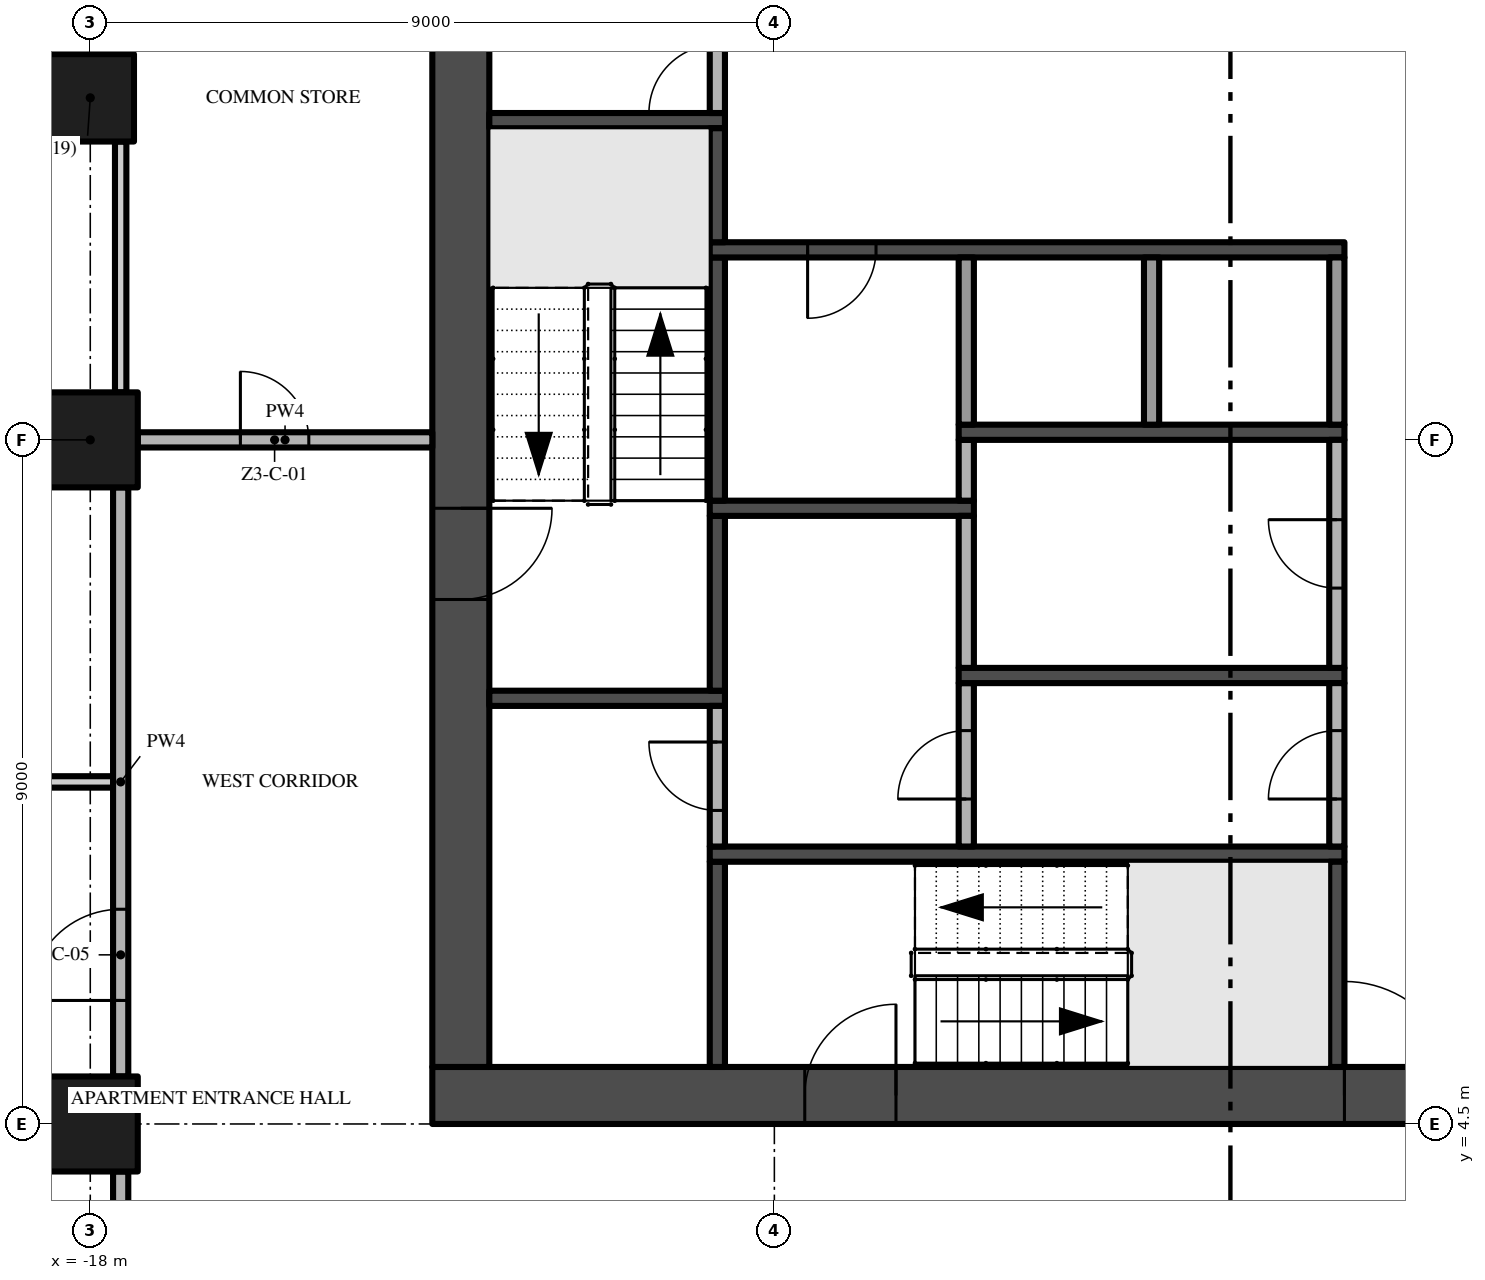
"""IFC4 building model, lengths in metres.
Left out: names, types, materials, properties, quantities, classifications, styles, units other than length and angle.
Written with IfcOpenShell. Run it as: python <this file> out.ifc"""

import sys

from ifc_helpers import new_model, si_unit, direction, frame, frame_2d, origin, origin_2d, place, context, subcontext, project, spatial, rectangle, extrude, element, fill, save


model = new_model("IFC4")
c1 = context("Model", 3, precision=1e-05, world=origin(), true_north=direction((0.0, 1.0)))
c2 = subcontext(c1, "Body", "Model", "MODEL_VIEW")
j1 = project(units=[si_unit("LENGTHUNIT", "METRE"), si_unit("PLANEANGLEUNIT", "RADIAN")], contexts=[c1])
p1 = place(None, origin())
s1 = spatial("IfcSite", under=j1, at=p1, CompositionType="ELEMENT")
p2 = place(p1, origin())
s2 = spatial("IfcBuilding", under=s1, at=p2, CompositionType="ELEMENT")
p3 = place(p2, frame((0.0, 0.0, 151.6)))
s3 = spatial("IfcBuildingStorey", under=s2, at=p3, CompositionType="ELEMENT", Elevation=151.6)
p4 = place(p3, frame((-13.5, 4.875, -0.3), z_axis=(0.0, 0.0, 1.0), x_axis=(1.0, 0.0, 0.0)))
e1 = element("IfcWall", 1, at=p4, inside=s3, PredefinedType="SHEAR", context=c2, shape_type="SweptSolid", body=[
    extrude(rectangle(XDim=27.0, YDim=0.75, at=frame_2d((13.5, 0.0))), origin(), (0.0, 0.0, 1.0), 3.8),
])
p5 = place(p4, frame((12.0, 0.0, 0.3)))
e2 = element("IfcOpeningElement", 2, at=p5, cuts=e1, PredefinedType="OPENING", context=c2, shape_type="SweptSolid", body=[
    extrude(rectangle(XDim=3.0, YDim=2.4, at=frame_2d((1.5, 1.2))), frame((0.0, 0.385, 0.0), z_axis=(0.0, -1.0, 0.0), x_axis=(1.0, 0.0, 0.0)), (0.0, 0.0, 1.0), 0.77),
])
p6 = place(p4, frame((4.9, 0.0, 0.3)))
e3 = element("IfcOpeningElement", 3, at=p6, cuts=e1, PredefinedType="OPENING", context=c2, shape_type="SweptSolid", body=[
    extrude(rectangle(XDim=1.2, YDim=2.2, at=frame_2d((0.6, 1.1))), frame((0.0, 0.385, 0.0), z_axis=(0.0, -1.0, 0.0), x_axis=(1.0, 0.0, 0.0)), (0.0, 0.0, 1.0), 0.77),
])
p7 = place(p4, frame((20.75, 0.0, 0.3)))
e4 = element("IfcOpeningElement", 4, at=p7, cuts=e1, PredefinedType="OPENING", context=c2, shape_type="SweptSolid", body=[
    extrude(rectangle(XDim=1.5, YDim=2.2, at=frame_2d((0.75, 1.1))), frame((0.0, 0.385, 0.0), z_axis=(0.0, -1.0, 0.0), x_axis=(1.0, 0.0, 0.0)), (0.0, 0.0, 1.0), 0.77),
])
p8 = place(p4, frame((17.4, 0.0, 0.3)))
e5 = element("IfcOpeningElement", 5, at=p8, cuts=e1, PredefinedType="OPENING", context=c2, shape_type="SweptSolid", body=[
    extrude(rectangle(XDim=1.2, YDim=2.2, at=frame_2d((0.6, 1.1))), frame((0.0, 0.385, 0.0), z_axis=(0.0, -1.0, 0.0), x_axis=(1.0, 0.0, 0.0)), (0.0, 0.0, 1.0), 0.77),
])
p9 = place(p3, frame((-13.125, 21.75, -0.3), z_axis=(0.0, 0.0, 1.0), x_axis=(0.0, -1.0, 0.0)))
e6 = element("IfcWall", 6, at=p9, inside=s3, PredefinedType="SHEAR", context=c2, shape_type="SweptSolid", body=[
    extrude(rectangle(XDim=16.5, YDim=0.75, at=frame_2d((8.25, 0.0))), origin(), (0.0, 0.0, 1.0), 3.8),
])
p10 = place(p9, frame((9.15, 0.0, 0.3)))
e7 = element("IfcOpeningElement", 7, at=p10, cuts=e6, PredefinedType="OPENING", context=c2, shape_type="SweptSolid", body=[
    extrude(rectangle(XDim=1.2, YDim=2.2, at=frame_2d((0.6, 1.1))), frame((0.0, 0.385, 0.0), z_axis=(0.0, -1.0, 0.0), x_axis=(1.0, 0.0, 0.0)), (0.0, 0.0, 1.0), 0.77),
])
for number, where, z_axis, x_axis in (
    (8, (-18.0, 13.5, 0.0), (0.0, 0.0, 1.0), (1.0, 0.0, 0.0)),
    (9, (-18.0, 4.5, 0.0), (0.0, 0.0, 1.0), (1.0, 0.0, 0.0)),
):
    element("IfcColumn", number, at=place(p3, frame(where, z_axis=z_axis, x_axis=x_axis)), inside=s3, PredefinedType="COLUMN", context=c2, shape_type="SweptSolid", body=[
        extrude(rectangle(XDim=1.25, YDim=1.25, at=origin_2d()), origin(), (0.0, 0.0, 1.0), 3.5),
    ])
p11 = place(p3, frame((-18.0, 18.0, 0.0), z_axis=(0.0, 0.0, 1.0), x_axis=(1.0, 0.0, 0.0)))
e10 = element("IfcColumn", 10, at=p11, inside=s3, PredefinedType="COLUMN", context=c2, shape_type="SweptSolid", body=[
    extrude(rectangle(XDim=1.15, YDim=1.15, at=origin_2d()), origin(), (0.0, 0.0, 1.0), 3.5),
])
for number, where, z_axis, x_axis in (
    (11, (-12.75, 10.1, 0.0), (0.0, 0.0, 1.0), (1.0, 0.0, 0.0)),
    (12, (-12.75, 17.7, 0.0), (0.0, 0.0, 1.0), (1.0, 0.0, 0.0)),
):
    element("IfcWall", number, at=place(p3, frame(where, z_axis=z_axis, x_axis=x_axis)), inside=s3, PredefinedType="SHEAR", context=c2, shape_type="SweptSolid", body=[
        extrude(rectangle(XDim=3.1, YDim=0.2, at=frame_2d((1.55, 0.0))), origin(), (0.0, 0.0, 1.0), 3.5),
    ])
p12 = place(p3, frame((-9.75, 5.25, 0.0), z_axis=(0.0, 0.0, 1.0), x_axis=(0.0, 1.0, 0.0)))
e13 = element("IfcWall", 13, at=p12, inside=s3, PredefinedType="SHEAR", context=c2, shape_type="SweptSolid", body=[
    extrude(rectangle(XDim=2.7, YDim=0.2, at=frame_2d((1.35, 0.0))), origin(), (0.0, 0.0, 1.0), 3.5),
])
p13 = place(p3, frame((-9.85, 8.05, 0.0), z_axis=(0.0, 0.0, 1.0), x_axis=(1.0, 0.0, 0.0)))
e14 = element("IfcWall", 14, at=p13, inside=s3, PredefinedType="SHEAR", context=c2, shape_type="SweptSolid", body=[
    extrude(rectangle(XDim=8.35, YDim=0.2, at=frame_2d((4.175, 0.0))), origin(), (0.0, 0.0, 1.0), 3.5),
])
p14 = place(p3, frame((-9.75, 8.15, 0.0), z_axis=(0.0, 0.0, 1.0), x_axis=(0.0, 1.0, 0.0)))
e15 = element("IfcWall", 15, at=p14, inside=s3, PredefinedType="PARTITIONING", context=c2, shape_type="SweptSolid", body=[
    extrude(rectangle(XDim=1.85, YDim=0.2, at=frame_2d((0.925, 0.0))), origin(), (0.0, 0.0, 1.0), 3.5),
])
p15 = place(p14, frame((0.475, 0.0, 0.0)))
e16 = element("IfcOpeningElement", 16, at=p15, cuts=e15, PredefinedType="OPENING", context=c2, shape_type="SweptSolid", body=[
    extrude(rectangle(XDim=0.9, YDim=2.1, at=frame_2d((0.45, 1.05))), frame((0.0, 0.11, 0.0), z_axis=(0.0, -1.0, 0.0), x_axis=(1.0, 0.0, 0.0)), (0.0, 0.0, 1.0), 0.22),
])
p16 = place(p3, frame((-9.75, 10.2, 0.0), z_axis=(0.0, 0.0, 1.0), x_axis=(0.0, 1.0, 0.0)))
e17 = element("IfcWall", 17, at=p16, inside=s3, PredefinedType="SHEAR", context=c2, shape_type="SweptSolid", body=[
    extrude(rectangle(XDim=2.3, YDim=0.2, at=frame_2d((1.15, 0.0))), origin(), (0.0, 0.0, 1.0), 3.5),
])
p17 = place(p3, frame((-9.85, 12.6, 0.0), z_axis=(0.0, 0.0, 1.0), x_axis=(1.0, 0.0, 0.0)))
e18 = element("IfcWall", 18, at=p17, inside=s3, PredefinedType="SHEAR", context=c2, shape_type="SweptSolid", body=[
    extrude(rectangle(XDim=3.475, YDim=0.2, at=frame_2d((1.738, 0.0))), origin(), (0.0, 0.0, 1.0), 3.5),
])
p18 = place(p3, frame((-9.75, 12.7, 0.0), z_axis=(0.0, 0.0, 1.0), x_axis=(0.0, 1.0, 0.0)))
e19 = element("IfcWall", 19, at=p18, inside=s3, PredefinedType="SHEAR", context=c2, shape_type="SweptSolid", body=[
    extrude(rectangle(XDim=3.2, YDim=0.2, at=frame_2d((1.6, 0.0))), origin(), (0.0, 0.0, 1.0), 3.5),
])
p19 = place(p3, frame((-1.5, 16.0, 0.0), z_axis=(0.0, 0.0, 1.0), x_axis=(-1.0, 0.0, 0.0)))
e20 = element("IfcWall", 20, at=p19, inside=s3, PredefinedType="SHEAR", context=c2, shape_type="SweptSolid", body=[
    extrude(rectangle(XDim=8.35, YDim=0.2, at=frame_2d((4.175, 0.0))), origin(), (0.0, 0.0, 1.0), 3.5),
])
p20 = place(p19, frame((6.162, 0.0, 0.0)))
e21 = element("IfcOpeningElement", 21, at=p20, cuts=e20, PredefinedType="OPENING", context=c2, shape_type="SweptSolid", body=[
    extrude(rectangle(XDim=0.9, YDim=2.1, at=frame_2d((0.45, 1.05))), frame((0.0, 0.11, 0.0), z_axis=(0.0, -1.0, 0.0), x_axis=(1.0, 0.0, 0.0)), (0.0, 0.0, 1.0), 0.22),
])
p21 = place(p3, frame((-9.75, 16.1, 0.0), z_axis=(0.0, 0.0, 1.0), x_axis=(0.0, 1.0, 0.0)))
e22 = element("IfcWall", 22, at=p21, inside=s3, PredefinedType="SHEAR", context=c2, shape_type="SweptSolid", body=[
    extrude(rectangle(XDim=1.5, YDim=0.2, at=frame_2d((0.75, 0.0))), origin(), (0.0, 0.0, 1.0), 3.5),
])
p22 = place(p3, frame((-9.75, 17.8, 0.0), z_axis=(0.0, 0.0, 1.0), x_axis=(0.0, 1.0, 0.0)))
e23 = element("IfcWall", 23, at=p22, inside=s3, PredefinedType="PARTITIONING", context=c2, shape_type="SweptSolid", body=[
    extrude(rectangle(XDim=1.4, YDim=0.2, at=frame_2d((0.7, 0.0))), origin(), (0.0, 0.0, 1.0), 3.5),
])
p23 = place(p22, origin())
e24 = element("IfcOpeningElement", 24, at=p23, cuts=e23, PredefinedType="OPENING", context=c2, shape_type="SweptSolid", body=[
    extrude(rectangle(XDim=0.9, YDim=2.1, at=frame_2d((0.45, 1.05))), frame((0.0, 0.11, 0.0), z_axis=(0.0, -1.0, 0.0), x_axis=(1.0, 0.0, 0.0)), (0.0, 0.0, 1.0), 0.22),
])
p24 = place(p3, frame((-6.475, 8.15, 0.0), z_axis=(0.0, 0.0, 1.0), x_axis=(0.0, 1.0, 0.0)))
e25 = element("IfcWall", 25, at=p24, inside=s3, PredefinedType="PARTITIONING", context=c2, shape_type="SweptSolid", body=[
    extrude(rectangle(XDim=2.15, YDim=0.2, at=frame_2d((1.075, 0.0))), origin(), (0.0, 0.0, 1.0), 3.5),
])
p25 = place(p24, frame((0.625, 0.0, 0.0)))
e26 = element("IfcOpeningElement", 26, at=p25, cuts=e25, PredefinedType="OPENING", context=c2, shape_type="SweptSolid", body=[
    extrude(rectangle(XDim=0.9, YDim=2.1, at=frame_2d((0.45, 1.05))), frame((0.0, 0.11, 0.0), z_axis=(0.0, -1.0, 0.0), x_axis=(1.0, 0.0, 0.0)), (0.0, 0.0, 1.0), 0.22),
])
p26 = place(p3, frame((-6.575, 10.4, 0.0), z_axis=(0.0, 0.0, 1.0), x_axis=(1.0, 0.0, 0.0)))
e27 = element("IfcWall", 27, at=p26, inside=s3, PredefinedType="SHEAR", context=c2, shape_type="SweptSolid", body=[
    extrude(rectangle(XDim=5.075, YDim=0.2, at=frame_2d((2.538, 0.0))), origin(), (0.0, 0.0, 1.0), 3.5),
])
p27 = place(p3, frame((-6.475, 10.5, 0.0), z_axis=(0.0, 0.0, 1.0), x_axis=(0.0, 1.0, 0.0)))
e28 = element("IfcWall", 28, at=p27, inside=s3, PredefinedType="PARTITIONING", context=c2, shape_type="SweptSolid", body=[
    extrude(rectangle(XDim=2.0, YDim=0.2, at=frame_2d((1.0, 0.0))), origin(), (0.0, 0.0, 1.0), 3.5),
])
p28 = place(p3, frame((-6.475, 12.7, 0.0), z_axis=(0.0, 0.0, 1.0), x_axis=(0.0, 1.0, 0.0)))
e29 = element("IfcWall", 29, at=p28, inside=s3, PredefinedType="PARTITIONING", context=c2, shape_type="SweptSolid", body=[
    extrude(rectangle(XDim=0.8, YDim=0.2, at=frame_2d((0.4, 0.0))), origin(), (0.0, 0.0, 1.0), 3.5),
])
p29 = place(p3, frame((-6.575, 13.6, 0.0), z_axis=(0.0, 0.0, 1.0), x_axis=(1.0, 0.0, 0.0)))
e30 = element("IfcWall", 30, at=p29, inside=s3, PredefinedType="SHEAR", context=c2, shape_type="SweptSolid", body=[
    extrude(rectangle(XDim=5.075, YDim=0.2, at=frame_2d((2.538, 0.0))), origin(), (0.0, 0.0, 1.0), 3.5),
])
for number, where, z_axis, x_axis in (
    (31, (-6.475, 13.7, 0.0), (0.0, 0.0, 1.0), (0.0, 1.0, 0.0)),
    (32, (-4.037, 13.7, 0.0), (0.0, 0.0, 1.0), (0.0, 1.0, 0.0)),
):
    element("IfcWall", number, at=place(p3, frame(where, z_axis=z_axis, x_axis=x_axis)), inside=s3, PredefinedType="PARTITIONING", context=c2, shape_type="SweptSolid", body=[
        extrude(rectangle(XDim=2.2, YDim=0.2, at=frame_2d((1.1, 0.0))), origin(), (0.0, 0.0, 1.0), 3.5),
    ])
p30 = place(p3, frame((-1.6, 5.25, 0.0), z_axis=(0.0, 0.0, 1.0), x_axis=(0.0, 1.0, 0.0)))
e33 = element("IfcWall", 33, at=p30, inside=s3, PredefinedType="SHEAR", context=c2, shape_type="SweptSolid", body=[
    extrude(rectangle(XDim=2.7, YDim=0.2, at=frame_2d((1.35, 0.0))), origin(), (0.0, 0.0, 1.0), 3.5),
])
p31 = place(p3, frame((-1.6, 8.15, 0.0), z_axis=(0.0, 0.0, 1.0), x_axis=(0.0, 1.0, 0.0)))
e34 = element("IfcWall", 34, at=p31, inside=s3, PredefinedType="PARTITIONING", context=c2, shape_type="SweptSolid", body=[
    extrude(rectangle(XDim=2.15, YDim=0.2, at=frame_2d((1.075, 0.0))), origin(), (0.0, 0.0, 1.0), 3.5),
])
p32 = place(p31, frame((0.625, 0.0, 0.0)))
e35 = element("IfcOpeningElement", 35, at=p32, cuts=e34, PredefinedType="OPENING", context=c2, shape_type="SweptSolid", body=[
    extrude(rectangle(XDim=0.9, YDim=2.1, at=frame_2d((0.45, 1.05))), frame((0.0, 0.11, 0.0), z_axis=(0.0, -1.0, 0.0), x_axis=(1.0, 0.0, 0.0)), (0.0, 0.0, 1.0), 0.22),
])
p33 = place(p3, frame((-1.6, 10.5, 0.0), z_axis=(0.0, 0.0, 1.0), x_axis=(0.0, 1.0, 0.0)))
e36 = element("IfcWall", 36, at=p33, inside=s3, PredefinedType="PARTITIONING", context=c2, shape_type="SweptSolid", body=[
    extrude(rectangle(XDim=3.0, YDim=0.2, at=frame_2d((1.5, 0.0))), origin(), (0.0, 0.0, 1.0), 3.5),
])
p34 = place(p33, frame((1.05, 0.0, 0.0)))
e37 = element("IfcOpeningElement", 37, at=p34, cuts=e36, PredefinedType="OPENING", context=c2, shape_type="SweptSolid", body=[
    extrude(rectangle(XDim=0.9, YDim=2.1, at=frame_2d((0.45, 1.05))), frame((0.0, 0.11, 0.0), z_axis=(0.0, -1.0, 0.0), x_axis=(1.0, 0.0, 0.0)), (0.0, 0.0, 1.0), 0.22),
])
p35 = place(p3, frame((-1.6, 13.7, 0.0), z_axis=(0.0, 0.0, 1.0), x_axis=(0.0, 1.0, 0.0)))
e38 = element("IfcWall", 38, at=p35, inside=s3, PredefinedType="PARTITIONING", context=c2, shape_type="SweptSolid", body=[
    extrude(rectangle(XDim=2.2, YDim=0.2, at=frame_2d((1.1, 0.0))), origin(), (0.0, 0.0, 1.0), 3.5),
])
p36 = place(p3, frame((-22.2, 9.0, 0.0), z_axis=(0.0, 0.0, 1.0), x_axis=(1.0, 0.0, 0.0)))
e39 = element("IfcWall", 39, at=p36, inside=s3, PredefinedType="PARTITIONING", context=c2, shape_type="SweptSolid", body=[
    extrude(rectangle(XDim=4.5, YDim=0.15, at=frame_2d((2.25, 0.0))), origin(), (0.0, 0.0, 1.0), 3.5),
])
p37 = place(p36, frame((1.25, 0.0, 0.0)))
e40 = element("IfcOpeningElement", 40, at=p37, cuts=e39, PredefinedType="OPENING", context=c2, shape_type="SweptSolid", body=[
    extrude(rectangle(XDim=1.8, YDim=2.4, at=frame_2d((0.9, 1.2))), frame((0.0, 0.085, 0.0), z_axis=(0.0, -1.0, 0.0), x_axis=(1.0, 0.0, 0.0)), (0.0, 0.0, 1.0), 0.17),
])
p38 = place(p3, frame((-17.375, 13.5, 0.0), z_axis=(0.0, 0.0, 1.0), x_axis=(1.0, 0.0, 0.0)))
e41 = element("IfcWall", 41, at=p38, inside=s3, PredefinedType="PARTITIONING", context=c2, shape_type="SweptSolid", body=[
    extrude(rectangle(XDim=3.875, YDim=0.2, at=frame_2d((1.938, 0.0))), origin(), (0.0, 0.0, 1.0), 3.5),
])
p39 = place(p38, frame((1.35, 0.0, 0.0)))
e42 = element("IfcOpeningElement", 42, at=p39, cuts=e41, PredefinedType="OPENING", context=c2, shape_type="SweptSolid", body=[
    extrude(rectangle(XDim=0.9, YDim=2.1, at=frame_2d((0.45, 1.05))), frame((0.0, 0.11, 0.0), z_axis=(0.0, -1.0, 0.0), x_axis=(1.0, 0.0, 0.0)), (0.0, 0.0, 1.0), 0.22),
])
p40 = place(p3, frame((-17.6, -0.2, 0.0), z_axis=(0.0, 0.0, 1.0), x_axis=(0.0, 1.0, 0.0)))
e43 = element("IfcWall", 43, at=p40, inside=s3, PredefinedType="PARTITIONING", context=c2, shape_type="SweptSolid", body=[
    extrude(rectangle(XDim=4.075, YDim=0.2, at=frame_2d((2.038, 0.0))), origin(), (0.0, 0.0, 1.0), 3.5),
])
p41 = place(p3, frame((-17.6, 5.125, 0.0), z_axis=(0.0, 0.0, 1.0), x_axis=(0.0, 1.0, 0.0)))
e44 = element("IfcWall", 44, at=p41, inside=s3, PredefinedType="PARTITIONING", context=c2, shape_type="SweptSolid", body=[
    extrude(rectangle(XDim=7.75, YDim=0.2, at=frame_2d((3.875, 0.0))), origin(), (0.0, 0.0, 1.0), 3.5),
])
p42 = place(p41, frame((1.0, 0.0, 0.0)))
e45 = element("IfcOpeningElement", 45, at=p42, cuts=e44, PredefinedType="OPENING", context=c2, shape_type="SweptSolid", body=[
    extrude(rectangle(XDim=1.2, YDim=2.4, at=frame_2d((0.6, 1.2))), frame((0.0, 0.11, 0.0), z_axis=(0.0, -1.0, 0.0), x_axis=(1.0, 0.0, 0.0)), (0.0, 0.0, 1.0), 0.22),
])
p43 = place(p3, frame((-17.6, 14.125, 0.0), z_axis=(0.0, 0.0, 1.0), x_axis=(0.0, 1.0, 0.0)))
e46 = element("IfcWall", 46, at=p43, inside=s3, PredefinedType="PARTITIONING", context=c2, shape_type="SweptSolid", body=[
    extrude(rectangle(XDim=3.3, YDim=0.15, at=frame_2d((1.65, 0.0))), origin(), (0.0, 0.0, 1.0), 3.5),
])
p44 = place(p3, frame((-17.6, 18.575, 0.0), z_axis=(0.0, 0.0, 1.0), x_axis=(0.0, 1.0, 0.0)))
e47 = element("IfcWall", 47, at=p44, inside=s3, PredefinedType="PARTITIONING", context=c2, shape_type="SweptSolid", body=[
    extrude(rectangle(XDim=2.775, YDim=0.15, at=frame_2d((1.387, 0.0))), origin(), (0.0, 0.0, 1.0), 3.5),
])
p45 = place(p5, frame((3.0, 0.0, 0.0), z_axis=(0.0, 0.0, 1.0), x_axis=(-1.0, 0.0, 0.0)))
e48 = element("IfcDoor", 48, at=p45, inside=s3, OperationType="DOUBLE_DOOR_SINGLE_SWING", PredefinedType="DOOR", context=c2, shape_type="SweptSolid", body=[
    extrude(rectangle(XDim=3.0, YDim=2.4, at=frame_2d((1.5, 1.2))), frame((0.0, 0.025, 0.0), z_axis=(0.0, -1.0, 0.0), x_axis=(1.0, 0.0, 0.0)), (0.0, 0.0, 1.0), 0.05),
])
fill(e2, e48)
p46 = place(p10, frame((1.2, 0.0, 0.0), z_axis=(0.0, 0.0, 1.0), x_axis=(-1.0, 0.0, 0.0)))
e49 = element("IfcDoor", 49, at=p46, inside=s3, OperationType="SINGLE_SWING_RIGHT", PredefinedType="DOOR", context=c2, shape_type="SweptSolid", body=[
    extrude(rectangle(XDim=1.2, YDim=2.2, at=frame_2d((0.6, 1.1))), frame((0.0, 0.025, 0.0), z_axis=(0.0, -1.0, 0.0), x_axis=(1.0, 0.0, 0.0)), (0.0, 0.0, 1.0), 0.05),
])
fill(e7, e49)
p47 = place(p6, frame((1.2, 0.0, 0.0), z_axis=(0.0, 0.0, 1.0), x_axis=(-1.0, 0.0, 0.0)))
e50 = element("IfcDoor", 50, at=p47, inside=s3, OperationType="SINGLE_SWING_LEFT", PredefinedType="DOOR", context=c2, shape_type="SweptSolid", body=[
    extrude(rectangle(XDim=1.2, YDim=2.2, at=frame_2d((0.6, 1.1))), frame((0.0, 0.025, 0.0), z_axis=(0.0, -1.0, 0.0), x_axis=(1.0, 0.0, 0.0)), (0.0, 0.0, 1.0), 0.05),
])
fill(e3, e50)
p48 = place(p20, origin())
e51 = element("IfcDoor", 51, at=p48, inside=s3, OperationType="SINGLE_SWING_RIGHT", PredefinedType="DOOR", context=c2, shape_type="SweptSolid", body=[
    extrude(rectangle(XDim=0.9, YDim=2.1, at=frame_2d((0.45, 1.05))), frame((0.0, 0.025, 0.0), z_axis=(0.0, -1.0, 0.0), x_axis=(1.0, 0.0, 0.0)), (0.0, 0.0, 1.0), 0.05),
])
fill(e21, e51)
p49 = place(p32, origin())
e52 = element("IfcDoor", 52, at=p49, inside=s3, OperationType="SINGLE_SWING_LEFT", PredefinedType="DOOR", context=c2, shape_type="SweptSolid", body=[
    extrude(rectangle(XDim=0.9, YDim=2.1, at=frame_2d((0.45, 1.05))), frame((0.0, 0.025, 0.0), z_axis=(0.0, -1.0, 0.0), x_axis=(1.0, 0.0, 0.0)), (0.0, 0.0, 1.0), 0.05),
])
fill(e35, e52)
p50 = place(p34, origin())
e53 = element("IfcDoor", 53, at=p50, inside=s3, OperationType="SINGLE_SWING_RIGHT", PredefinedType="DOOR", context=c2, shape_type="SweptSolid", body=[
    extrude(rectangle(XDim=0.9, YDim=2.1, at=frame_2d((0.45, 1.05))), frame((0.0, 0.025, 0.0), z_axis=(0.0, -1.0, 0.0), x_axis=(1.0, 0.0, 0.0)), (0.0, 0.0, 1.0), 0.05),
])
fill(e37, e53)
p51 = place(p23, origin())
e54 = element("IfcDoor", 54, at=p51, inside=s3, OperationType="SINGLE_SWING_LEFT", PredefinedType="DOOR", context=c2, shape_type="SweptSolid", body=[
    extrude(rectangle(XDim=0.9, YDim=2.1, at=frame_2d((0.45, 1.05))), frame((0.0, 0.025, 0.0), z_axis=(0.0, -1.0, 0.0), x_axis=(1.0, 0.0, 0.0)), (0.0, 0.0, 1.0), 0.05),
])
fill(e24, e54)
p52 = place(p25, origin())
e55 = element("IfcDoor", 55, at=p52, inside=s3, OperationType="SINGLE_SWING_LEFT", PredefinedType="DOOR", context=c2, shape_type="SweptSolid", body=[
    extrude(rectangle(XDim=0.9, YDim=2.1, at=frame_2d((0.45, 1.05))), frame((0.0, 0.025, 0.0), z_axis=(0.0, -1.0, 0.0), x_axis=(1.0, 0.0, 0.0)), (0.0, 0.0, 1.0), 0.05),
])
fill(e26, e55)
p53 = place(p15, origin())
e56 = element("IfcDoor", 56, at=p53, inside=s3, OperationType="SINGLE_SWING_RIGHT", PredefinedType="DOOR", context=c2, shape_type="SweptSolid", body=[
    extrude(rectangle(XDim=0.9, YDim=2.1, at=frame_2d((0.45, 1.05))), frame((0.0, 0.025, 0.0), z_axis=(0.0, -1.0, 0.0), x_axis=(1.0, 0.0, 0.0)), (0.0, 0.0, 1.0), 0.05),
])
fill(e16, e56)
p54 = place(p39, origin())
e57 = element("IfcDoor", 57, at=p54, inside=s3, OperationType="SINGLE_SWING_LEFT", PredefinedType="DOOR", context=c2, shape_type="SweptSolid", body=[
    extrude(rectangle(XDim=0.9, YDim=2.1, at=frame_2d((0.45, 1.05))), frame((0.0, 0.025, 0.0), z_axis=(0.0, -1.0, 0.0), x_axis=(1.0, 0.0, 0.0)), (0.0, 0.0, 1.0), 0.05),
])
fill(e42, e57)
p55 = place(p42, origin())
e58 = element("IfcDoor", 58, at=p55, inside=s3, OperationType="SINGLE_SWING_LEFT", PredefinedType="DOOR", context=c2, shape_type="SweptSolid", body=[
    extrude(rectangle(XDim=1.2, YDim=2.4, at=frame_2d((0.6, 1.2))), frame((0.0, 0.025, 0.0), z_axis=(0.0, -1.0, 0.0), x_axis=(1.0, 0.0, 0.0)), (0.0, 0.0, 1.0), 0.05),
])
fill(e45, e58)
save(model, sys.argv[1])
